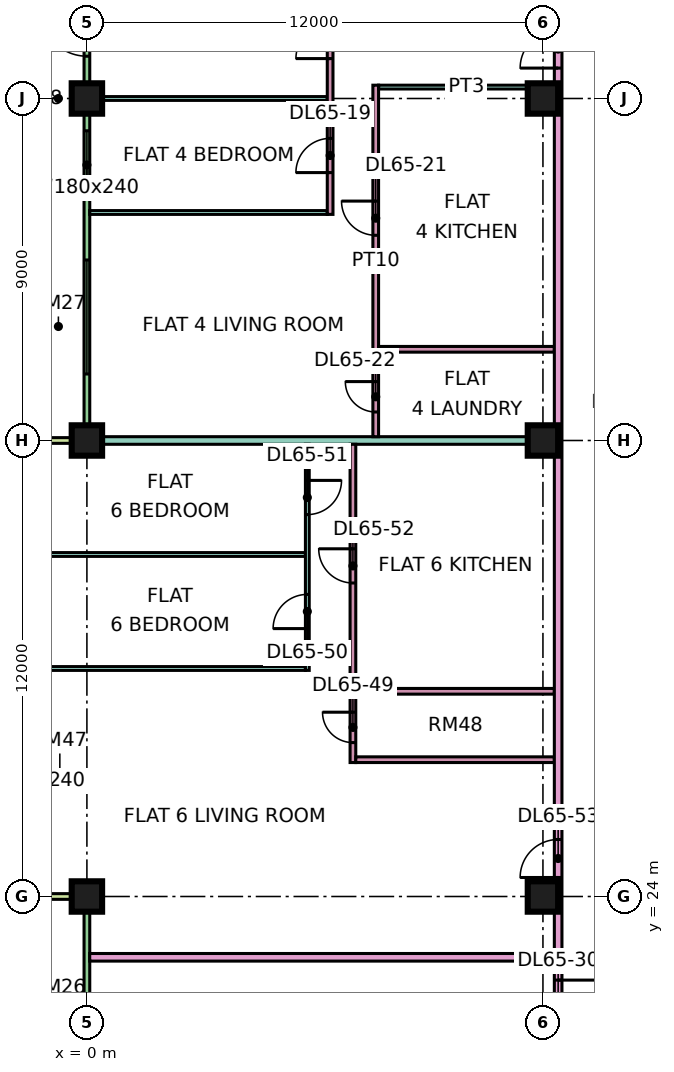
"""IFC4 building model, lengths in metres.
Left out: names, types, materials, properties, quantities, classifications, styles, units other than length and angle.
Written with IfcOpenShell. Run it as: python <this file> out.ifc"""

import sys

from ifc_helpers import new_model, si_unit, direction, frame, frame_2d, origin, origin_2d, place, context, subcontext, project, spatial, rectangle, extrude, element, fill, save


model = new_model("IFC4")
c1 = context("Model", 3, precision=1e-05, world=origin(), true_north=direction((0.0, 1.0)))
c2 = subcontext(c1, "Body", "Model", "MODEL_VIEW")
j1 = project(units=[si_unit("LENGTHUNIT", "METRE"), si_unit("PLANEANGLEUNIT", "RADIAN")], contexts=[c1])
p1 = place(None, origin())
s1 = spatial("IfcSite", under=j1, at=p1, CompositionType="ELEMENT")
p2 = place(p1, origin())
s2 = spatial("IfcBuilding", under=s1, at=p2, CompositionType="ELEMENT")
p3 = place(p2, frame((0.0, 0.0, 280.9)))
s3 = spatial("IfcBuildingStorey", under=s2, at=p3, CompositionType="ELEMENT", Elevation=280.9)
p4 = place(p3, frame((0.0, 24.0, 0.0), z_axis=(0.0, 0.0, 1.0), x_axis=(1.0, 0.0, 0.0)))
e1 = element("IfcColumn", 1, at=p4, inside=s3, PredefinedType="COLUMN", context=c2, shape_type="SweptSolid", body=[
    extrude(rectangle(XDim=0.8, YDim=0.8, at=origin_2d()), origin(), (0.0, 0.0, 1.0), 3.75),
])
p5 = place(p3, frame((0.0, 36.0, 0.0), z_axis=(0.0, 0.0, 1.0), x_axis=(1.0, 0.0, 0.0)))
e2 = element("IfcColumn", 2, at=p5, inside=s3, PredefinedType="COLUMN", context=c2, shape_type="SweptSolid", body=[
    extrude(rectangle(XDim=0.8, YDim=0.8, at=origin_2d()), origin(), (0.0, 0.0, 1.0), 3.75),
])
for number, where, z_axis, x_axis in (
    (3, (0.0, 45.0, 0.0), (0.0, 0.0, 1.0), (1.0, 0.0, 0.0)),
    (4, (12.0, 24.0, 0.0), (0.0, 0.0, 1.0), (1.0, 0.0, 0.0)),
    (5, (12.0, 36.0, 0.0), (0.0, 0.0, 1.0), (1.0, 0.0, 0.0)),
    (6, (12.0, 45.0, 0.0), (0.0, 0.0, 1.0), (1.0, 0.0, 0.0)),
):
    element("IfcColumn", number, at=place(p3, frame(where, z_axis=z_axis, x_axis=x_axis)), inside=s3, PredefinedType="COLUMN", context=c2, shape_type="SweptSolid", body=[
        extrude(rectangle(XDim=0.8, YDim=0.8, at=origin_2d()), origin(), (0.0, 0.0, 1.0), 3.75),
    ])
p6 = place(p3, frame((0.0, 47.925, 0.0), z_axis=(0.0, 0.0, 1.0), x_axis=(0.0, -1.0, 0.0)))
e7 = element("IfcWall", 7, at=p6, inside=s3, PredefinedType="SOLIDWALL", context=c2, shape_type="SweptSolid", body=[
    extrude(rectangle(XDim=11.85, YDim=0.15, at=frame_2d((5.925, 0.0))), origin(), (0.0, 0.0, 1.0), 3.35),
])
p7 = place(p6, frame((0.613, 0.0, 0.0)))
e8 = element("IfcOpeningElement", 8, at=p7, cuts=e7, PredefinedType="OPENING", context=c2, shape_type="SweptSolid", body=[
    extrude(rectangle(XDim=1.2, YDim=2.4, at=frame_2d((0.6, 1.2))), frame((0.0, 0.085, 0.0), z_axis=(0.0, -1.0, 0.0), x_axis=(1.0, 0.0, 0.0)), (0.0, 0.0, 1.0), 0.17),
])
p8 = place(p6, frame((3.775, 0.0, 0.45)))
e9 = element("IfcOpeningElement", 9, at=p8, cuts=e7, PredefinedType="OPENING", context=c2, shape_type="SweptSolid", body=[
    extrude(rectangle(XDim=1.8, YDim=2.4, at=frame_2d((0.9, 1.2))), frame((0.0, 0.085, 0.0), z_axis=(0.0, -1.0, 0.0), x_axis=(1.0, 0.0, 0.0)), (0.0, 0.0, 1.0), 0.17),
])
p9 = place(p6, frame((7.175, 0.0, 0.45)))
e10 = element("IfcOpeningElement", 10, at=p9, cuts=e7, PredefinedType="OPENING", context=c2, shape_type="SweptSolid", body=[
    extrude(rectangle(XDim=3.0, YDim=2.4, at=frame_2d((1.5, 1.2))), frame((0.0, 0.085, 0.0), z_axis=(0.0, -1.0, 0.0), x_axis=(1.0, 0.0, 0.0)), (0.0, 0.0, 1.0), 0.17),
])
p10 = place(p3, frame((-1.5, 36.0, 0.0), z_axis=(0.0, 0.0, 1.0), x_axis=(1.0, 0.0, 0.0)))
e11 = element("IfcWall", 11, at=p10, inside=s3, PredefinedType="SOLIDWALL", context=c2, shape_type="SweptSolid", body=[
    extrude(rectangle(XDim=1.5, YDim=0.15, at=frame_2d((0.75, 0.0))), origin(), (0.0, 0.0, 1.0), 3.35),
])
p11 = place(p3, frame((0.0, 23.925, 0.0), z_axis=(0.0, 0.0, 1.0), x_axis=(0.0, -1.0, 0.0)))
e12 = element("IfcWall", 12, at=p11, inside=s3, PredefinedType="SOLIDWALL", context=c2, shape_type="SweptSolid", body=[
    extrude(rectangle(XDim=11.35, YDim=0.15, at=frame_2d((5.675, 0.0))), origin(), (0.0, 0.0, 1.0), 3.35),
])
p12 = place(p11, frame((6.738, 0.0, 0.0)))
e13 = element("IfcOpeningElement", 13, at=p12, cuts=e12, PredefinedType="OPENING", context=c2, shape_type="SweptSolid", body=[
    extrude(rectangle(XDim=1.8, YDim=2.4, at=frame_2d((0.9, 1.2))), frame((0.0, 0.085, 0.0), z_axis=(0.0, -1.0, 0.0), x_axis=(1.0, 0.0, 0.0)), (0.0, 0.0, 1.0), 0.17),
])
p13 = place(p3, frame((-1.5, 24.0, 0.0), z_axis=(0.0, 0.0, 1.0), x_axis=(1.0, 0.0, 0.0)))
e14 = element("IfcWall", 14, at=p13, inside=s3, PredefinedType="SOLIDWALL", context=c2, shape_type="SweptSolid", body=[
    extrude(rectangle(XDim=1.5, YDim=0.15, at=frame_2d((0.75, 0.0))), origin(), (0.0, 0.0, 1.0), 3.35),
])
p14 = place(p3, frame((-1.351, 33.0, 0.0), z_axis=(0.0, 0.0, 1.0), x_axis=(1.0, 0.0, 0.0)))
e15 = element("IfcWall", 15, at=p14, inside=s3, PredefinedType="PARTITIONING", context=c2, shape_type="SweptSolid", body=[
    extrude(rectangle(XDim=7.101, YDim=0.1, at=frame_2d((3.551, 0.0))), origin(), (0.0, 0.0, 1.0), 3.35),
])
p15 = place(p3, frame((-1.35, 30.0, 0.0), z_axis=(0.0, 0.0, 1.0), x_axis=(1.0, 0.0, 0.0)))
e16 = element("IfcWall", 16, at=p15, inside=s3, PredefinedType="PARTITIONING", context=c2, shape_type="SweptSolid", body=[
    extrude(rectangle(XDim=7.1, YDim=0.1, at=frame_2d((3.55, 0.0))), origin(), (0.0, 0.0, 1.0), 3.35),
])
e17 = element("IfcWall", 17, at=p5, inside=s3, PredefinedType="PARTITIONING", context=c2, shape_type="SweptSolid", body=[
    extrude(rectangle(XDim=12.3, YDim=0.2, at=frame_2d((6.15, 0.0))), origin(), (0.0, 0.0, 1.0), 3.35),
])
p16 = place(p3, frame((0.074, 22.4, 0.0), z_axis=(0.0, 0.0, 1.0), x_axis=(1.0, 0.0, 0.0)))
e18 = element("IfcWall", 18, at=p16, inside=s3, PredefinedType="PARTITIONING", context=c2, shape_type="SweptSolid", body=[
    extrude(rectangle(XDim=12.226, YDim=0.2, at=frame_2d((6.113, 0.0))), origin(), (0.0, 0.0, 1.0), 3.35),
])
for number, where, z_axis, x_axis in (
    (19, (0.074, 42.0, 0.0), (0.0, 0.0, 1.0), (1.0, 0.0, 0.0)),
    (20, (0.074, 45.0, 0.0), (0.0, 0.0, 1.0), (1.0, 0.0, 0.0)),
):
    element("IfcWall", number, at=place(p3, frame(where, z_axis=z_axis, x_axis=x_axis)), inside=s3, PredefinedType="PARTITIONING", context=c2, shape_type="SweptSolid", body=[
        extrude(rectangle(XDim=6.251, YDim=0.1, at=frame_2d((3.125, 0.0))), origin(), (0.0, 0.0, 1.0), 3.35),
    ])
p17 = place(p3, frame((5.8, 29.95, 0.0), z_axis=(0.0, 0.0, 1.0), x_axis=(0.0, 1.0, 0.0)))
e21 = element("IfcWall", 21, at=p17, inside=s3, PredefinedType="PARTITIONING", context=c2, shape_type="SweptSolid", body=[
    extrude(rectangle(XDim=5.95, YDim=0.1, at=frame_2d((2.975, 0.0))), origin(), (0.0, 0.0, 1.0), 3.35),
])
p18 = place(p17, frame((1.1, 0.0, 0.0)))
e22 = element("IfcOpeningElement", 22, at=p18, cuts=e21, PredefinedType="OPENING", context=c2, shape_type="SweptSolid", body=[
    extrude(rectangle(XDim=0.9, YDim=2.1, at=frame_2d((0.45, 1.05))), frame((0.0, 0.06, 0.0), z_axis=(0.0, -1.0, 0.0), x_axis=(1.0, 0.0, 0.0)), (0.0, 0.0, 1.0), 0.12),
])
p19 = place(p17, frame((4.1, 0.0, 0.0)))
e23 = element("IfcOpeningElement", 23, at=p19, cuts=e21, PredefinedType="OPENING", context=c2, shape_type="SweptSolid", body=[
    extrude(rectangle(XDim=0.9, YDim=2.1, at=frame_2d((0.45, 1.05))), frame((0.0, 0.06, 0.0), z_axis=(0.0, -1.0, 0.0), x_axis=(1.0, 0.0, 0.0)), (0.0, 0.0, 1.0), 0.12),
])
p20 = place(p3, frame((6.4, 41.95, 0.0), z_axis=(0.0, 0.0, 1.0), x_axis=(0.0, 1.0, 0.0)))
e24 = element("IfcWall", 24, at=p20, inside=s3, PredefinedType="PARTITIONING", context=c2, shape_type="SweptSolid", body=[
    extrude(rectangle(XDim=13.4, YDim=0.15, at=frame_2d((6.7, 0.0))), origin(), (0.0, 0.0, 1.0), 3.35),
])
p21 = place(p20, frame((1.1, 0.0, 0.0)))
e25 = element("IfcOpeningElement", 25, at=p21, cuts=e24, PredefinedType="OPENING", context=c2, shape_type="SweptSolid", body=[
    extrude(rectangle(XDim=0.9, YDim=2.1, at=frame_2d((0.45, 1.05))), frame((0.0, 0.085, 0.0), z_axis=(0.0, -1.0, 0.0), x_axis=(1.0, 0.0, 0.0)), (0.0, 0.0, 1.0), 0.17),
])
p22 = place(p20, frame((4.1, 0.0, 0.0)))
e26 = element("IfcOpeningElement", 26, at=p22, cuts=e24, PredefinedType="OPENING", context=c2, shape_type="SweptSolid", body=[
    extrude(rectangle(XDim=0.9, YDim=2.1, at=frame_2d((0.45, 1.05))), frame((0.0, 0.085, 0.0), z_axis=(0.0, -1.0, 0.0), x_axis=(1.0, 0.0, 0.0)), (0.0, 0.0, 1.0), 0.17),
])
p23 = place(p20, frame((10.95, 0.0, 0.0)))
e27 = element("IfcOpeningElement", 27, at=p23, cuts=e24, PredefinedType="OPENING", context=c2, shape_type="SweptSolid", body=[
    extrude(rectangle(XDim=0.8, YDim=2.1, at=frame_2d((0.4, 1.05))), frame((0.0, 0.085, 0.0), z_axis=(0.0, -1.0, 0.0), x_axis=(1.0, 0.0, 0.0)), (0.0, 0.0, 1.0), 0.17),
])
p24 = place(p20, frame((6.7, 0.0, 0.0)))
e28 = element("IfcOpeningElement", 28, at=p24, cuts=e24, PredefinedType="OPENING", context=c2, shape_type="SweptSolid", body=[
    extrude(rectangle(XDim=1.6, YDim=2.1, at=frame_2d((0.8, 1.05))), frame((0.0, 0.085, 0.0), z_axis=(0.0, -1.0, 0.0), x_axis=(1.0, 0.0, 0.0)), (0.0, 0.0, 1.0), 0.17),
])
p25 = place(p3, frame((7.0, 27.525, 0.0), z_axis=(0.0, 0.0, 1.0), x_axis=(0.0, 1.0, 0.0)))
e29 = element("IfcWall", 29, at=p25, inside=s3, PredefinedType="PARTITIONING", context=c2, shape_type="SweptSolid", body=[
    extrude(rectangle(XDim=8.375, YDim=0.15, at=frame_2d((4.188, 0.0))), origin(), (0.0, 0.0, 1.0), 3.35),
])
p26 = place(p25, frame((0.525, 0.0, 0.0)))
e30 = element("IfcOpeningElement", 30, at=p26, cuts=e29, PredefinedType="OPENING", context=c2, shape_type="SweptSolid", body=[
    extrude(rectangle(XDim=0.8, YDim=2.1, at=frame_2d((0.4, 1.05))), frame((0.0, 0.085, 0.0), z_axis=(0.0, -1.0, 0.0), x_axis=(1.0, 0.0, 0.0)), (0.0, 0.0, 1.0), 0.17),
])
p27 = place(p25, frame((4.725, 0.0, 0.0)))
e31 = element("IfcOpeningElement", 31, at=p27, cuts=e29, PredefinedType="OPENING", context=c2, shape_type="SweptSolid", body=[
    extrude(rectangle(XDim=0.9, YDim=2.1, at=frame_2d((0.45, 1.05))), frame((0.0, 0.085, 0.0), z_axis=(0.0, -1.0, 0.0), x_axis=(1.0, 0.0, 0.0)), (0.0, 0.0, 1.0), 0.17),
])
for number, where, z_axis, x_axis in (
    (32, (7.075, 27.6, 0.0), (0.0, 0.0, 1.0), (1.0, 0.0, 0.0)),
    (33, (7.075, 29.4, 0.0), (0.0, 0.0, 1.0), (1.0, 0.0, 0.0)),
):
    element("IfcWall", number, at=place(p3, frame(where, z_axis=z_axis, x_axis=x_axis)), inside=s3, PredefinedType="PARTITIONING", context=c2, shape_type="SweptSolid", body=[
        extrude(rectangle(XDim=5.225, YDim=0.15, at=frame_2d((2.613, 0.0))), origin(), (0.0, 0.0, 1.0), 3.35),
    ])
p28 = place(p3, frame((7.6, 36.1, 0.0), z_axis=(0.0, 0.0, 1.0), x_axis=(0.0, 1.0, 0.0)))
e34 = element("IfcWall", 34, at=p28, inside=s3, PredefinedType="PARTITIONING", context=c2, shape_type="SweptSolid", body=[
    extrude(rectangle(XDim=9.25, YDim=0.15, at=frame_2d((4.625, 0.0))), origin(), (0.0, 0.0, 1.0), 3.35),
])
p29 = place(p28, frame((5.3, 0.0, 0.0)))
e35 = element("IfcOpeningElement", 35, at=p29, cuts=e34, PredefinedType="OPENING", context=c2, shape_type="SweptSolid", body=[
    extrude(rectangle(XDim=0.9, YDim=2.1, at=frame_2d((0.45, 1.05))), frame((0.0, 0.085, 0.0), z_axis=(0.0, -1.0, 0.0), x_axis=(1.0, 0.0, 0.0)), (0.0, 0.0, 1.0), 0.17),
])
p30 = place(p28, frame((0.65, 0.0, 0.0)))
e36 = element("IfcOpeningElement", 36, at=p30, cuts=e34, PredefinedType="OPENING", context=c2, shape_type="SweptSolid", body=[
    extrude(rectangle(XDim=0.8, YDim=2.1, at=frame_2d((0.4, 1.05))), frame((0.0, 0.085, 0.0), z_axis=(0.0, -1.0, 0.0), x_axis=(1.0, 0.0, 0.0)), (0.0, 0.0, 1.0), 0.17),
])
p31 = place(p3, frame((7.675, 38.4, 0.0), z_axis=(0.0, 0.0, 1.0), x_axis=(1.0, 0.0, 0.0)))
e37 = element("IfcWall", 37, at=p31, inside=s3, PredefinedType="PARTITIONING", context=c2, shape_type="SweptSolid", body=[
    extrude(rectangle(XDim=4.625, YDim=0.15, at=frame_2d((2.312, 0.0))), origin(), (0.0, 0.0, 1.0), 3.35),
])
p32 = place(p3, frame((7.675, 45.3, 0.0), z_axis=(0.0, 0.0, 1.0), x_axis=(1.0, 0.0, 0.0)))
e38 = element("IfcWall", 38, at=p32, inside=s3, PredefinedType="PARTITIONING", context=c2, shape_type="SweptSolid", body=[
    extrude(rectangle(XDim=4.625, YDim=0.1, at=frame_2d((2.312, 0.0))), origin(), (0.0, 0.0, 1.0), 3.35),
])
p33 = place(p3, frame((12.4, 20.0, 0.0), z_axis=(0.0, 0.0, 1.0), x_axis=(0.0, 1.0, 0.0)))
e39 = element("IfcWall", 39, at=p33, inside=s3, PredefinedType="PARTITIONING", context=c2, shape_type="SweptSolid", body=[
    extrude(rectangle(XDim=33.926, YDim=0.2, at=frame_2d((16.963, 0.0))), origin(), (0.0, 0.0, 1.0), 3.35),
])
p34 = place(p33, frame((25.8, 0.0, 0.0)))
e40 = element("IfcOpeningElement", 40, at=p34, cuts=e39, PredefinedType="OPENING", context=c2, shape_type="SweptSolid", body=[
    extrude(rectangle(XDim=1.0, YDim=2.1, at=frame_2d((0.5, 1.05))), frame((0.0, 0.11, 0.0), z_axis=(0.0, -1.0, 0.0), x_axis=(1.0, 0.0, 0.0)), (0.0, 0.0, 1.0), 0.22),
])
p35 = place(p33, frame((0.6, 0.0, 0.0)))
e41 = element("IfcOpeningElement", 41, at=p35, cuts=e39, PredefinedType="OPENING", context=c2, shape_type="SweptSolid", body=[
    extrude(rectangle(XDim=1.2, YDim=2.1, at=frame_2d((0.6, 1.05))), frame((0.0, 0.11, 0.0), z_axis=(0.0, -1.0, 0.0), x_axis=(1.0, 0.0, 0.0)), (0.0, 0.0, 1.0), 0.22),
])
p36 = place(p33, frame((4.5, 0.0, 0.0)))
e42 = element("IfcOpeningElement", 42, at=p36, cuts=e39, PredefinedType="OPENING", context=c2, shape_type="SweptSolid", body=[
    extrude(rectangle(XDim=1.0, YDim=2.1, at=frame_2d((0.5, 1.05))), frame((0.0, 0.11, 0.0), z_axis=(0.0, -1.0, 0.0), x_axis=(1.0, 0.0, 0.0)), (0.0, 0.0, 1.0), 0.22),
])
p37 = place(p7, frame((1.2, 0.0, 0.0), z_axis=(0.0, 0.0, 1.0), x_axis=(-1.0, 0.0, 0.0)))
e43 = element("IfcDoor", 43, at=p37, inside=s3, OperationType="DOUBLE_DOOR_SINGLE_SWING", PredefinedType="DOOR", context=c2, shape_type="SweptSolid", body=[
    extrude(rectangle(XDim=1.2, YDim=2.4, at=frame_2d((0.6, 1.2))), frame((0.0, 0.025, 0.0), z_axis=(0.0, -1.0, 0.0), x_axis=(1.0, 0.0, 0.0)), (0.0, 0.0, 1.0), 0.05),
])
fill(e8, e43)
p38 = place(p8, origin())
e44 = element("IfcWindow", 44, at=p38, inside=s3, PartitioningType="SINGLE_PANEL", PredefinedType="WINDOW", context=c2, shape_type="SweptSolid", body=[
    extrude(rectangle(XDim=1.8, YDim=2.4, at=frame_2d((0.9, 1.2))), frame((0.0, 0.03, 0.0), z_axis=(0.0, -1.0, 0.0), x_axis=(1.0, 0.0, 0.0)), (0.0, 0.0, 1.0), 0.06),
])
fill(e9, e44)
p39 = place(p9, origin())
e45 = element("IfcWindow", 45, at=p39, inside=s3, PartitioningType="SINGLE_PANEL", PredefinedType="WINDOW", context=c2, shape_type="SweptSolid", body=[
    extrude(rectangle(XDim=3.0, YDim=2.4, at=frame_2d((1.5, 1.2))), frame((0.0, 0.03, 0.0), z_axis=(0.0, -1.0, 0.0), x_axis=(1.0, 0.0, 0.0)), (0.0, 0.0, 1.0), 0.06),
])
fill(e10, e45)
p40 = place(p21, origin())
e46 = element("IfcDoor", 46, at=p40, inside=s3, OperationType="SINGLE_SWING_LEFT", PredefinedType="DOOR", context=c2, shape_type="SweptSolid", body=[
    extrude(rectangle(XDim=0.9, YDim=2.1, at=frame_2d((0.45, 1.05))), frame((0.0, 0.025, 0.0), z_axis=(0.0, -1.0, 0.0), x_axis=(1.0, 0.0, 0.0)), (0.0, 0.0, 1.0), 0.05),
])
fill(e25, e46)
p41 = place(p22, origin())
e47 = element("IfcDoor", 47, at=p41, inside=s3, OperationType="SINGLE_SWING_LEFT", PredefinedType="DOOR", context=c2, shape_type="SweptSolid", body=[
    extrude(rectangle(XDim=0.9, YDim=2.1, at=frame_2d((0.45, 1.05))), frame((0.0, 0.025, 0.0), z_axis=(0.0, -1.0, 0.0), x_axis=(1.0, 0.0, 0.0)), (0.0, 0.0, 1.0), 0.05),
])
fill(e26, e47)
p42 = place(p29, frame((0.9, 0.0, 0.0), z_axis=(0.0, 0.0, 1.0), x_axis=(-1.0, 0.0, 0.0)))
e48 = element("IfcDoor", 48, at=p42, inside=s3, OperationType="SINGLE_SWING_RIGHT", PredefinedType="DOOR", context=c2, shape_type="SweptSolid", body=[
    extrude(rectangle(XDim=0.9, YDim=2.1, at=frame_2d((0.45, 1.05))), frame((0.0, 0.025, 0.0), z_axis=(0.0, -1.0, 0.0), x_axis=(1.0, 0.0, 0.0)), (0.0, 0.0, 1.0), 0.05),
])
fill(e35, e48)
p43 = place(p30, frame((0.8, 0.0, 0.0), z_axis=(0.0, 0.0, 1.0), x_axis=(-1.0, 0.0, 0.0)))
e49 = element("IfcDoor", 49, at=p43, inside=s3, OperationType="SINGLE_SWING_RIGHT", PredefinedType="DOOR", context=c2, shape_type="SweptSolid", body=[
    extrude(rectangle(XDim=0.8, YDim=2.1, at=frame_2d((0.4, 1.05))), frame((0.0, 0.025, 0.0), z_axis=(0.0, -1.0, 0.0), x_axis=(1.0, 0.0, 0.0)), (0.0, 0.0, 1.0), 0.05),
])
fill(e36, e49)
p44 = place(p34, origin())
e50 = element("IfcDoor", 50, at=p44, inside=s3, OperationType="SINGLE_SWING_LEFT", PredefinedType="DOOR", context=c2, shape_type="SweptSolid", body=[
    extrude(rectangle(XDim=1.0, YDim=2.1, at=frame_2d((0.5, 1.05))), frame((0.0, 0.025, 0.0), z_axis=(0.0, -1.0, 0.0), x_axis=(1.0, 0.0, 0.0)), (0.0, 0.0, 1.0), 0.05),
])
fill(e40, e50)
p45 = place(p35, origin())
e51 = element("IfcDoor", 51, at=p45, inside=s3, OperationType="SINGLE_SWING_RIGHT", PredefinedType="DOOR", context=c2, shape_type="SweptSolid", body=[
    extrude(rectangle(XDim=1.2, YDim=2.1, at=frame_2d((0.6, 1.05))), frame((0.0, 0.025, 0.0), z_axis=(0.0, -1.0, 0.0), x_axis=(1.0, 0.0, 0.0)), (0.0, 0.0, 1.0), 0.05),
])
fill(e41, e51)
p46 = place(p26, frame((0.8, 0.0, 0.0), z_axis=(0.0, 0.0, 1.0), x_axis=(-1.0, 0.0, 0.0)))
e52 = element("IfcDoor", 52, at=p46, inside=s3, OperationType="SINGLE_SWING_RIGHT", PredefinedType="DOOR", context=c2, shape_type="SweptSolid", body=[
    extrude(rectangle(XDim=0.8, YDim=2.1, at=frame_2d((0.4, 1.05))), frame((0.0, 0.025, 0.0), z_axis=(0.0, -1.0, 0.0), x_axis=(1.0, 0.0, 0.0)), (0.0, 0.0, 1.0), 0.05),
])
fill(e30, e52)
p47 = place(p18, origin())
e53 = element("IfcDoor", 53, at=p47, inside=s3, OperationType="SINGLE_SWING_LEFT", PredefinedType="DOOR", context=c2, shape_type="SweptSolid", body=[
    extrude(rectangle(XDim=0.9, YDim=2.1, at=frame_2d((0.45, 1.05))), frame((0.0, 0.025, 0.0), z_axis=(0.0, -1.0, 0.0), x_axis=(1.0, 0.0, 0.0)), (0.0, 0.0, 1.0), 0.05),
])
fill(e22, e53)
p48 = place(p19, origin())
e54 = element("IfcDoor", 54, at=p48, inside=s3, OperationType="SINGLE_SWING_RIGHT", PredefinedType="DOOR", context=c2, shape_type="SweptSolid", body=[
    extrude(rectangle(XDim=0.9, YDim=2.1, at=frame_2d((0.45, 1.05))), frame((0.0, 0.025, 0.0), z_axis=(0.0, -1.0, 0.0), x_axis=(1.0, 0.0, 0.0)), (0.0, 0.0, 1.0), 0.05),
])
fill(e23, e54)
p49 = place(p27, frame((0.9, 0.0, 0.0), z_axis=(0.0, 0.0, 1.0), x_axis=(-1.0, 0.0, 0.0)))
e55 = element("IfcDoor", 55, at=p49, inside=s3, OperationType="SINGLE_SWING_RIGHT", PredefinedType="DOOR", context=c2, shape_type="SweptSolid", body=[
    extrude(rectangle(XDim=0.9, YDim=2.1, at=frame_2d((0.45, 1.05))), frame((0.0, 0.025, 0.0), z_axis=(0.0, -1.0, 0.0), x_axis=(1.0, 0.0, 0.0)), (0.0, 0.0, 1.0), 0.05),
])
fill(e31, e55)
p50 = place(p36, origin())
e56 = element("IfcDoor", 56, at=p50, inside=s3, OperationType="SINGLE_SWING_LEFT", PredefinedType="DOOR", context=c2, shape_type="SweptSolid", body=[
    extrude(rectangle(XDim=1.0, YDim=2.1, at=frame_2d((0.5, 1.05))), frame((0.0, 0.025, 0.0), z_axis=(0.0, -1.0, 0.0), x_axis=(1.0, 0.0, 0.0)), (0.0, 0.0, 1.0), 0.05),
])
fill(e42, e56)
save(model, sys.argv[1])
